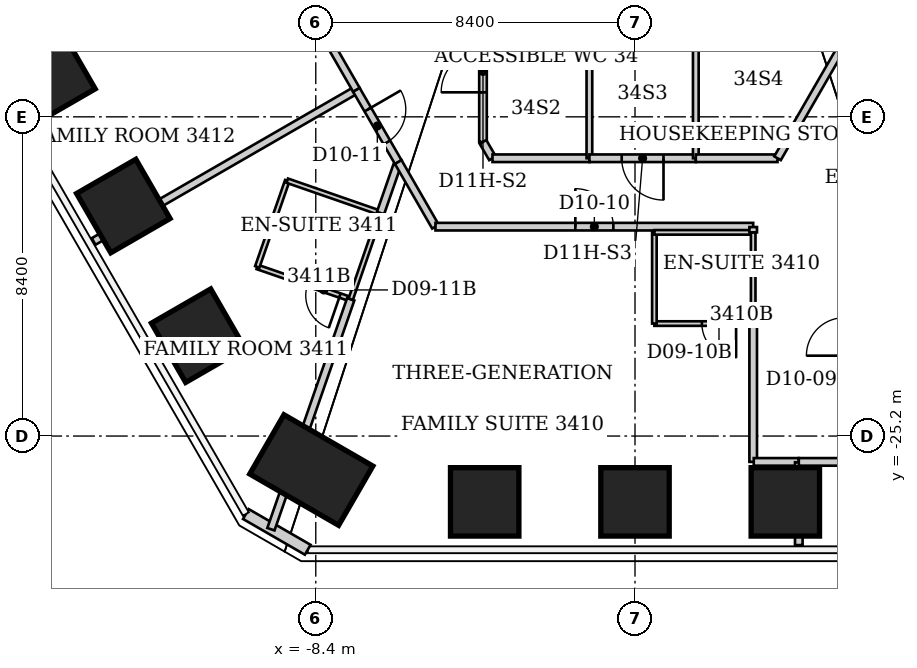
"""IFC4 building model, lengths in metres.
Left out: names, types, materials, properties, quantities, classifications, styles, units other than length and angle.
Written with IfcOpenShell. Run it as: python <this file> out.ifc"""

import sys

from ifc_helpers import new_model, si_unit, direction, frame, frame_2d, origin, origin_2d, place, context, subcontext, project, spatial, rectangle, extrude, element, fill, save


model = new_model("IFC4")
c1 = context("Model", 3, precision=1e-05, world=origin(), true_north=direction((0.0, 1.0)))
c2 = subcontext(c1, "Body", "Model", "MODEL_VIEW")
j1 = project(units=[si_unit("LENGTHUNIT", "METRE"), si_unit("PLANEANGLEUNIT", "RADIAN")], contexts=[c1])
p1 = place(None, origin())
s1 = spatial("IfcSite", under=j1, at=p1, CompositionType="ELEMENT")
p2 = place(p1, origin())
s2 = spatial("IfcBuilding", under=s1, at=p2, CompositionType="ELEMENT")
p3 = place(p2, frame((0.0, 0.0, 138.6)))
s3 = spatial("IfcBuildingStorey", under=s2, at=p3, CompositionType="ELEMENT", Elevation=138.6)
for number, where, z_axis, x_axis in (
    (1, (3.955, -26.932, 0.0), (0.0, 0.0, 1.0), (0.0, -1.0, 0.0)),
    (2, (0.0, -26.932, 0.0), (0.0, 0.0, 1.0), (0.0, -1.0, 0.0)),
    (3, (-3.955, -26.932, 0.0), (0.0, 0.0, 1.0), (0.0, -1.0, 0.0)),
):
    element("IfcColumn", number, at=place(p3, frame(where, z_axis=z_axis, x_axis=x_axis)), inside=s3, PredefinedType="COLUMN", context=c2, shape_type="SweptSolid", body=[
        extrude(rectangle(XDim=1.8, YDim=1.8, at=origin_2d()), origin(), (0.0, 0.0, 1.0), 3.8),
    ])
p4 = place(p3, frame((-8.518, -26.094, 0.0), z_axis=(0.0, 0.0, 1.0), x_axis=(-0.5, -0.866025403784, 0.0)))
e4 = element("IfcColumn", 4, at=p4, inside=s3, PredefinedType="COLUMN", context=c2, shape_type="SweptSolid", body=[
    extrude(rectangle(XDim=1.8, YDim=2.7, at=origin_2d()), origin(), (0.0, 0.0, 1.0), 3.8),
])
for number, where, z_axis, x_axis in (
    (5, (-11.494, -22.559, 0.0), (0.0, 0.0, 1.0), (-0.866, -0.5, 0.0)),
    (6, (-13.464, -19.147, 0.0), (0.0, 0.0, 1.0), (-0.866, -0.5, 0.0)),
    (7, (-15.434, -15.735, 0.0), (0.0, 0.0, 1.0), (-0.866, -0.5, 0.0)),
):
    element("IfcColumn", number, at=place(p3, frame(where, z_axis=z_axis, x_axis=x_axis)), inside=s3, PredefinedType="COLUMN", context=c2, shape_type="SweptSolid", body=[
        extrude(rectangle(XDim=1.8, YDim=1.8, at=origin_2d()), origin(), (0.0, 0.0, 1.0), 3.8),
    ])
p5 = place(p3, frame((-8.611, -28.192, 0.0), z_axis=(0.0, 0.0, 1.0), x_axis=(-0.866045024864, 0.499966013754, 0.0)))
e8 = element("IfcWall", 8, at=p5, inside=s3, PredefinedType="SOLIDWALL", context=c2, shape_type="SweptSolid", body=[
    extrude(rectangle(XDim=1.88, YDim=0.3, at=frame_2d((0.94, 0.0))), origin(), (0.0, 0.0, 1.0), 3.64),
])
p6 = place(p3, frame((-14.246, -20.08, 0.0), z_axis=(0.0, 0.0, 1.0), x_axis=(0.866178955952, 0.49973394548, 0.0)))
e9 = element("IfcWall", 9, at=p6, inside=s3, PredefinedType="PARTITIONING", context=c2, shape_type="SweptSolid", body=[
    extrude(rectangle(XDim=7.969, YDim=0.2, at=frame_2d((3.985, 0.0))), origin(), (0.0, 0.0, 1.0), 3.64),
])
p7 = place(p3, frame((-9.94, -20.75, 0.0), z_axis=(0.0, 0.0, 1.0), x_axis=(0.94515546045, -0.326620813149, 0.0)))
e10 = element("IfcWall", 10, at=p7, inside=s3, PredefinedType="PARTITIONING", context=c2, shape_type="SweptSolid", body=[
    extrude(rectangle(XDim=2.603, YDim=0.12, at=frame_2d((1.301, 0.0))), origin(), (0.0, 0.0, 1.0), 3.64),
])
p8 = place(p7, frame((1.403, 0.0, 0.0)))
e11 = element("IfcOpeningElement", 11, at=p8, cuts=e10, PredefinedType="OPENING", context=c2, shape_type="SweptSolid", body=[
    extrude(rectangle(XDim=0.9, YDim=2.03, at=frame_2d((0.45, 1.015))), frame((0.0, 0.06, 0.0), z_axis=(0.0, -1.0, 0.0), x_axis=(1.0, 0.0, 0.0)), (0.0, 0.0, 1.0), 0.12),
])
p9 = place(p3, frame((-9.61, -12.14, 0.0), z_axis=(0.0, 0.0, 1.0), x_axis=(0.499898533245, -0.866083977718, 0.0)))
e12 = element("IfcWall", 12, at=p9, inside=s3, PredefinedType="PARTITIONING", context=c2, shape_type="SweptSolid", body=[
    extrude(rectangle(XDim=4.561, YDim=0.2, at=frame_2d((2.281, 0.0))), origin(), (0.0, 0.0, 1.0), 3.64),
])
p10 = place(p3, frame((-9.58, -27.652, 0.0), z_axis=(0.0, 0.0, 1.0), x_axis=(0.327855318627, 0.944727944991, 0.0)))
e13 = element("IfcWall", 13, at=p10, inside=s3, PredefinedType="PARTITIONING", context=c2, shape_type="SweptSolid", body=[
    extrude(rectangle(XDim=6.406, YDim=0.2, at=frame_2d((3.203, 0.0))), origin(), (0.0, 0.0, 1.0), 3.64),
])
p11 = place(p3, frame((-9.15, -18.48, 0.0), z_axis=(0.0, 0.0, 1.0), x_axis=(-0.328693963496, -0.944436487203, 0.0)))
e14 = element("IfcWall", 14, at=p11, inside=s3, PredefinedType="PARTITIONING", context=c2, shape_type="SweptSolid", body=[
    extrude(rectangle(XDim=2.404, YDim=0.12, at=frame_2d((1.202, 0.0))), origin(), (0.0, 0.0, 1.0), 3.64),
])
p12 = place(p3, frame((-7.48, -21.6, 0.0), z_axis=(0.0, 0.0, 1.0), x_axis=(0.326492166492, 0.945199907543, 0.0)))
e15 = element("IfcWall", 15, at=p12, inside=s3, PredefinedType="PARTITIONING", context=c2, shape_type="SweptSolid", body=[
    extrude(rectangle(XDim=2.4, YDim=0.12, at=frame_2d((1.2, 0.0))), origin(), (0.0, 0.0, 1.0), 3.64),
])
p13 = place(p3, frame((-7.331, -16.091, 0.0), z_axis=(0.0, 0.0, 1.0), x_axis=(0.501518373175, -0.865146994081, 0.0)))
e16 = element("IfcWall", 16, at=p13, inside=s3, PredefinedType="PARTITIONING", context=c2, shape_type="SweptSolid", body=[
    extrude(rectangle(XDim=2.196, YDim=0.2, at=frame_2d((1.098, 0.0))), origin(), (0.0, 0.0, 1.0), 3.64),
])
p14 = place(p13, frame((0.598, 0.0, 0.0)))
e17 = element("IfcOpeningElement", 17, at=p14, cuts=e16, PredefinedType="OPENING", context=c2, shape_type="SweptSolid", body=[
    extrude(rectangle(XDim=1.0, YDim=2.13, at=frame_2d((0.5, 1.065))), frame((0.0, 0.1, 0.0), z_axis=(0.0, -1.0, 0.0), x_axis=(1.0, 0.0, 0.0)), (0.0, 0.0, 1.0), 0.2),
])
p15 = place(p3, frame((-6.7, -19.33, 0.0), z_axis=(0.0, 0.0, 1.0), x_axis=(-0.944753042377, 0.327782990589, 0.0)))
e18 = element("IfcWall", 18, at=p15, inside=s3, PredefinedType="PARTITIONING", context=c2, shape_type="SweptSolid", body=[
    extrude(rectangle(XDim=2.594, YDim=0.12, at=frame_2d((1.297, 0.0))), origin(), (0.0, 0.0, 1.0), 3.64),
])
p16 = place(p3, frame((-6.696, -19.331, 0.0), z_axis=(0.0, 0.0, 1.0), x_axis=(0.328298231075, 0.944574121746, 0.0)))
e19 = element("IfcWall", 19, at=p16, inside=s3, PredefinedType="PARTITIONING", context=c2, shape_type="SweptSolid", body=[
    extrude(rectangle(XDim=1.32, YDim=0.2, at=frame_2d((0.66, 0.0))), origin(), (0.0, 0.0, 1.0), 3.64),
])
p17 = place(p3, frame((-6.23, -17.99, 0.0), z_axis=(0.0, 0.0, 1.0), x_axis=(0.499431599995, -0.866353321068, 0.0)))
e20 = element("IfcWall", 20, at=p17, inside=s3, PredefinedType="PARTITIONING", context=c2, shape_type="SweptSolid", body=[
    extrude(rectangle(XDim=1.962, YDim=0.2, at=frame_2d((0.981, 0.0))), origin(), (0.0, 0.0, 1.0), 3.64),
])
p18 = place(p3, frame((-5.25, -19.69, 0.0), z_axis=(0.0, 0.0, 1.0), x_axis=(1.0, 0.0, 0.0)))
e21 = element("IfcWall", 21, at=p18, inside=s3, PredefinedType="PARTITIONING", context=c2, shape_type="SweptSolid", body=[
    extrude(rectangle(XDim=8.36, YDim=0.2, at=frame_2d((4.18, 0.0))), origin(), (0.0, 0.0, 1.0), 3.64),
])
p19 = place(p18, frame((3.68, 0.0, 0.0)))
e22 = element("IfcOpeningElement", 22, at=p19, cuts=e21, PredefinedType="OPENING", context=c2, shape_type="SweptSolid", body=[
    extrude(rectangle(XDim=1.0, YDim=2.13, at=frame_2d((0.5, 1.065))), frame((0.0, 0.1, 0.0), z_axis=(0.0, -1.0, 0.0), x_axis=(1.0, 0.0, 0.0)), (0.0, 0.0, 1.0), 0.2),
])
p20 = place(p3, frame((-4.0, -17.46, 0.0), z_axis=(0.0, 0.0, 1.0), x_axis=(0.0, 1.0, 0.0)))
e23 = element("IfcWall", 23, at=p20, inside=s3, PredefinedType="PARTITIONING", context=c2, shape_type="SweptSolid", body=[
    extrude(rectangle(XDim=3.71, YDim=0.2, at=frame_2d((1.855, 0.0))), origin(), (0.0, 0.0, 1.0), 2.878),
])
p21 = place(p20, frame((1.305, 0.0, 0.0)))
e24 = element("IfcOpeningElement", 24, at=p21, cuts=e23, PredefinedType="OPENING", context=c2, shape_type="SweptSolid", body=[
    extrude(rectangle(XDim=1.1, YDim=2.2, at=frame_2d((0.55, 1.1))), frame((0.0, 0.1, 0.0), z_axis=(0.0, -1.0, 0.0), x_axis=(1.0, 0.0, 0.0)), (0.0, 0.0, 1.0), 0.2),
])
p22 = place(p3, frame((-3.75, -17.89, 0.0), z_axis=(0.0, 0.0, 1.0), x_axis=(-0.502680181512, 0.864472460588, 0.0)))
e25 = element("IfcWall", 25, at=p22, inside=s3, PredefinedType="PARTITIONING", context=c2, shape_type="SweptSolid", body=[
    extrude(rectangle(XDim=0.497, YDim=0.2, at=frame_2d((0.249, 0.0))), origin(), (0.0, 0.0, 1.0), 3.64),
])
p23 = place(p3, frame((-1.2, -17.89, 0.0), z_axis=(0.0, 0.0, 1.0), x_axis=(-1.0, 0.0, 0.0)))
e26 = element("IfcWall", 26, at=p23, inside=s3, PredefinedType="PARTITIONING", context=c2, shape_type="SweptSolid", body=[
    extrude(rectangle(XDim=2.55, YDim=0.2, at=frame_2d((1.275, 0.0))), origin(), (0.0, 0.0, 1.0), 3.64),
])
p24 = place(p3, frame((-1.2, -13.75, 0.0), z_axis=(0.0, 0.0, 1.0), x_axis=(0.0, -1.0, 0.0)))
e27 = element("IfcWall", 27, at=p24, inside=s3, PredefinedType="PARTITIONING", context=c2, shape_type="SweptSolid", body=[
    extrude(rectangle(XDim=4.14, YDim=0.15, at=frame_2d((2.07, 0.0))), origin(), (0.0, 0.0, 1.0), 3.64),
])
p25 = place(p3, frame((0.51, -22.24, 0.0), z_axis=(0.0, 0.0, 1.0), x_axis=(1.0, 0.0, 0.0)))
e28 = element("IfcWall", 28, at=p25, inside=s3, PredefinedType="PARTITIONING", context=c2, shape_type="SweptSolid", body=[
    extrude(rectangle(XDim=2.6, YDim=0.12, at=frame_2d((1.3, 0.0))), origin(), (0.0, 0.0, 1.0), 3.64),
])
p26 = place(p25, frame((1.25, 0.0, 0.0)))
e29 = element("IfcOpeningElement", 29, at=p26, cuts=e28, PredefinedType="OPENING", context=c2, shape_type="SweptSolid", body=[
    extrude(rectangle(XDim=0.9, YDim=2.03, at=frame_2d((0.45, 1.015))), frame((0.0, 0.06, 0.0), z_axis=(0.0, -1.0, 0.0), x_axis=(1.0, 0.0, 0.0)), (0.0, 0.0, 1.0), 0.12),
])
p27 = place(p3, frame((0.51, -19.84, 0.0), z_axis=(0.0, 0.0, 1.0), x_axis=(0.0, -1.0, 0.0)))
e30 = element("IfcWall", 30, at=p27, inside=s3, PredefinedType="PARTITIONING", context=c2, shape_type="SweptSolid", body=[
    extrude(rectangle(XDim=2.4, YDim=0.12, at=frame_2d((1.2, 0.0))), origin(), (0.0, 0.0, 1.0), 3.64),
])
p28 = place(p3, frame((1.6, -17.89, 0.0), z_axis=(0.0, 0.0, 1.0), x_axis=(-1.0, 0.0, 0.0)))
e31 = element("IfcWall", 31, at=p28, inside=s3, PredefinedType="PARTITIONING", context=c2, shape_type="SweptSolid", body=[
    extrude(rectangle(XDim=2.8, YDim=0.2, at=frame_2d((1.4, 0.0))), origin(), (0.0, 0.0, 1.0), 3.64),
])
p29 = place(p28, frame((0.85, 0.0, 0.0)))
e32 = element("IfcOpeningElement", 32, at=p29, cuts=e31, PredefinedType="OPENING", context=c2, shape_type="SweptSolid", body=[
    extrude(rectangle(XDim=1.1, YDim=2.2, at=frame_2d((0.55, 1.1))), frame((0.0, 0.1, 0.0), z_axis=(0.0, -1.0, 0.0), x_axis=(1.0, 0.0, 0.0)), (0.0, 0.0, 1.0), 0.2),
])
p30 = place(p3, frame((1.6, -13.8, 0.0), z_axis=(0.0, 0.0, 1.0), x_axis=(0.0, -1.0, 0.0)))
e33 = element("IfcWall", 33, at=p30, inside=s3, PredefinedType="PARTITIONING", context=c2, shape_type="SweptSolid", body=[
    extrude(rectangle(XDim=4.09, YDim=0.15, at=frame_2d((2.045, 0.0))), origin(), (0.0, 0.0, 1.0), 3.64),
])
p31 = place(p3, frame((3.11, -22.24, 0.0), z_axis=(0.0, 0.0, 1.0), x_axis=(0.0, -1.0, 0.0)))
e34 = element("IfcWall", 34, at=p31, inside=s3, PredefinedType="PARTITIONING", context=c2, shape_type="SweptSolid", body=[
    extrude(rectangle(XDim=3.64, YDim=0.2, at=frame_2d((1.82, 0.0))), origin(), (0.0, 0.0, 1.0), 3.64),
])
p32 = place(p3, frame((3.11, -19.84, 0.0), z_axis=(0.0, 0.0, 1.0), x_axis=(-1.0, 0.0, 0.0)))
e35 = element("IfcWall", 35, at=p32, inside=s3, PredefinedType="PARTITIONING", context=c2, shape_type="SweptSolid", body=[
    extrude(rectangle(XDim=2.6, YDim=0.12, at=frame_2d((1.3, 0.0))), origin(), (0.0, 0.0, 1.0), 3.64),
])
p33 = place(p3, frame((3.11, -19.84, 0.0), z_axis=(0.0, 0.0, 1.0), x_axis=(0.0, -1.0, 0.0)))
e36 = element("IfcWall", 36, at=p33, inside=s3, PredefinedType="PARTITIONING", context=c2, shape_type="SweptSolid", body=[
    extrude(rectangle(XDim=2.4, YDim=0.12, at=frame_2d((1.2, 0.0))), origin(), (0.0, 0.0, 1.0), 3.64),
])
p34 = place(p3, frame((3.11, -19.7, 0.0), z_axis=(0.0, 0.0, 1.0), x_axis=(0.0, -1.0, 0.0)))
e37 = element("IfcWall", 37, at=p34, inside=s3, PredefinedType="PARTITIONING", context=c2, shape_type="SweptSolid", body=[
    extrude(rectangle(XDim=0.14, YDim=0.2, at=frame_2d((0.07, 0.0))), origin(), (0.0, 0.0, 1.0), 3.64),
])
p35 = place(p3, frame((3.125, -25.88, 0.0), z_axis=(0.0, 0.0, 1.0), x_axis=(1.0, 0.0, 0.0)))
e38 = element("IfcWall", 38, at=p35, inside=s3, PredefinedType="PARTITIONING", context=c2, shape_type="SweptSolid", body=[
    extrude(rectangle(XDim=1.185, YDim=0.2, at=frame_2d((0.593, 0.0))), origin(), (0.0, 0.0, 1.0), 3.64),
])
p36 = place(p3, frame((3.75, -17.89, 0.0), z_axis=(0.0, 0.0, 1.0), x_axis=(-1.0, 0.0, 0.0)))
e39 = element("IfcWall", 39, at=p36, inside=s3, PredefinedType="PARTITIONING", context=c2, shape_type="SweptSolid", body=[
    extrude(rectangle(XDim=2.15, YDim=0.2, at=frame_2d((1.075, 0.0))), origin(), (0.0, 0.0, 1.0), 3.64),
])
p37 = place(p3, frame((4.31, -28.07, 0.0), z_axis=(0.0, 0.0, 1.0), x_axis=(0.0, 1.0, 0.0)))
e40 = element("IfcWall", 40, at=p37, inside=s3, PredefinedType="PARTITIONING", context=c2, shape_type="SweptSolid", body=[
    extrude(rectangle(XDim=2.18, YDim=0.2, at=frame_2d((1.09, 0.0))), origin(), (0.0, 0.0, 1.0), 3.64),
])
p38 = place(p3, frame((4.31, -25.88, 0.0), z_axis=(0.0, 0.0, 1.0), x_axis=(1.0, 0.0, 0.0)))
e41 = element("IfcWall", 41, at=p38, inside=s3, PredefinedType="PARTITIONING", context=c2, shape_type="SweptSolid", body=[
    extrude(rectangle(XDim=1.19, YDim=0.2, at=frame_2d((0.595, 0.0))), origin(), (0.0, 0.0, 1.0), 3.64),
])
p39 = place(p3, frame((6.083, -13.85, 0.0), z_axis=(0.0, 0.0, 1.0), x_axis=(-0.499977643516, -0.866038310922, 0.0)))
e42 = element("IfcWall", 42, at=p39, inside=s3, PredefinedType="PARTITIONING", context=c2, shape_type="SweptSolid", body=[
    extrude(rectangle(XDim=4.665, YDim=0.2, at=frame_2d((2.333, 0.0))), origin(), (0.0, 0.0, 1.0), 3.64),
])
p40 = place(p19, origin())
e43 = element("IfcDoor", 43, at=p40, inside=s3, OperationType="SINGLE_SWING_LEFT", PredefinedType="DOOR", context=c2, shape_type="SweptSolid", body=[
    extrude(rectangle(XDim=1.0, YDim=2.13, at=frame_2d((0.5, 1.065))), frame((0.0, 0.025, 0.0), z_axis=(0.0, -1.0, 0.0), x_axis=(1.0, 0.0, 0.0)), (0.0, 0.0, 1.0), 0.05),
])
fill(e22, e43)
p41 = place(p26, origin())
e44 = element("IfcDoor", 44, at=p41, inside=s3, OperationType="SINGLE_SWING_RIGHT", PredefinedType="DOOR", context=c2, shape_type="SweptSolid", body=[
    extrude(rectangle(XDim=0.9, YDim=2.03, at=frame_2d((0.45, 1.015))), frame((0.0, 0.025, 0.0), z_axis=(0.0, -1.0, 0.0), x_axis=(1.0, 0.0, 0.0)), (0.0, 0.0, 1.0), 0.05),
])
fill(e29, e44)
p42 = place(p14, origin())
e45 = element("IfcDoor", 45, at=p42, inside=s3, OperationType="SINGLE_SWING_LEFT", PredefinedType="DOOR", context=c2, shape_type="SweptSolid", body=[
    extrude(rectangle(XDim=1.0, YDim=2.13, at=frame_2d((0.5, 1.065))), frame((0.0, 0.025, 0.0), z_axis=(0.0, -1.0, 0.0), x_axis=(1.0, 0.0, 0.0)), (0.0, 0.0, 1.0), 0.05),
])
fill(e17, e45)
p43 = place(p8, origin())
e46 = element("IfcDoor", 46, at=p43, inside=s3, OperationType="SINGLE_SWING_RIGHT", PredefinedType="DOOR", context=c2, shape_type="SweptSolid", body=[
    extrude(rectangle(XDim=0.9, YDim=2.03, at=frame_2d((0.45, 1.015))), frame((0.0, 0.025, 0.0), z_axis=(0.0, -1.0, 0.0), x_axis=(1.0, 0.0, 0.0)), (0.0, 0.0, 1.0), 0.05),
])
fill(e11, e46)
p44 = place(p21, origin())
e47 = element("IfcDoor", 47, at=p44, inside=s3, OperationType="SINGLE_SWING_LEFT", PredefinedType="DOOR", context=c2, shape_type="SweptSolid", body=[
    extrude(rectangle(XDim=1.1, YDim=2.2, at=frame_2d((0.55, 1.1))), frame((0.0, 0.025, 0.0), z_axis=(0.0, -1.0, 0.0), x_axis=(1.0, 0.0, 0.0)), (0.0, 0.0, 1.0), 0.05),
])
fill(e24, e47)
p45 = place(p29, origin())
e48 = element("IfcDoor", 48, at=p45, inside=s3, OperationType="SINGLE_SWING_LEFT", PredefinedType="DOOR", context=c2, shape_type="SweptSolid", body=[
    extrude(rectangle(XDim=1.1, YDim=2.2, at=frame_2d((0.55, 1.1))), frame((0.0, 0.025, 0.0), z_axis=(0.0, -1.0, 0.0), x_axis=(1.0, 0.0, 0.0)), (0.0, 0.0, 1.0), 0.05),
])
fill(e32, e48)
save(model, sys.argv[1])
